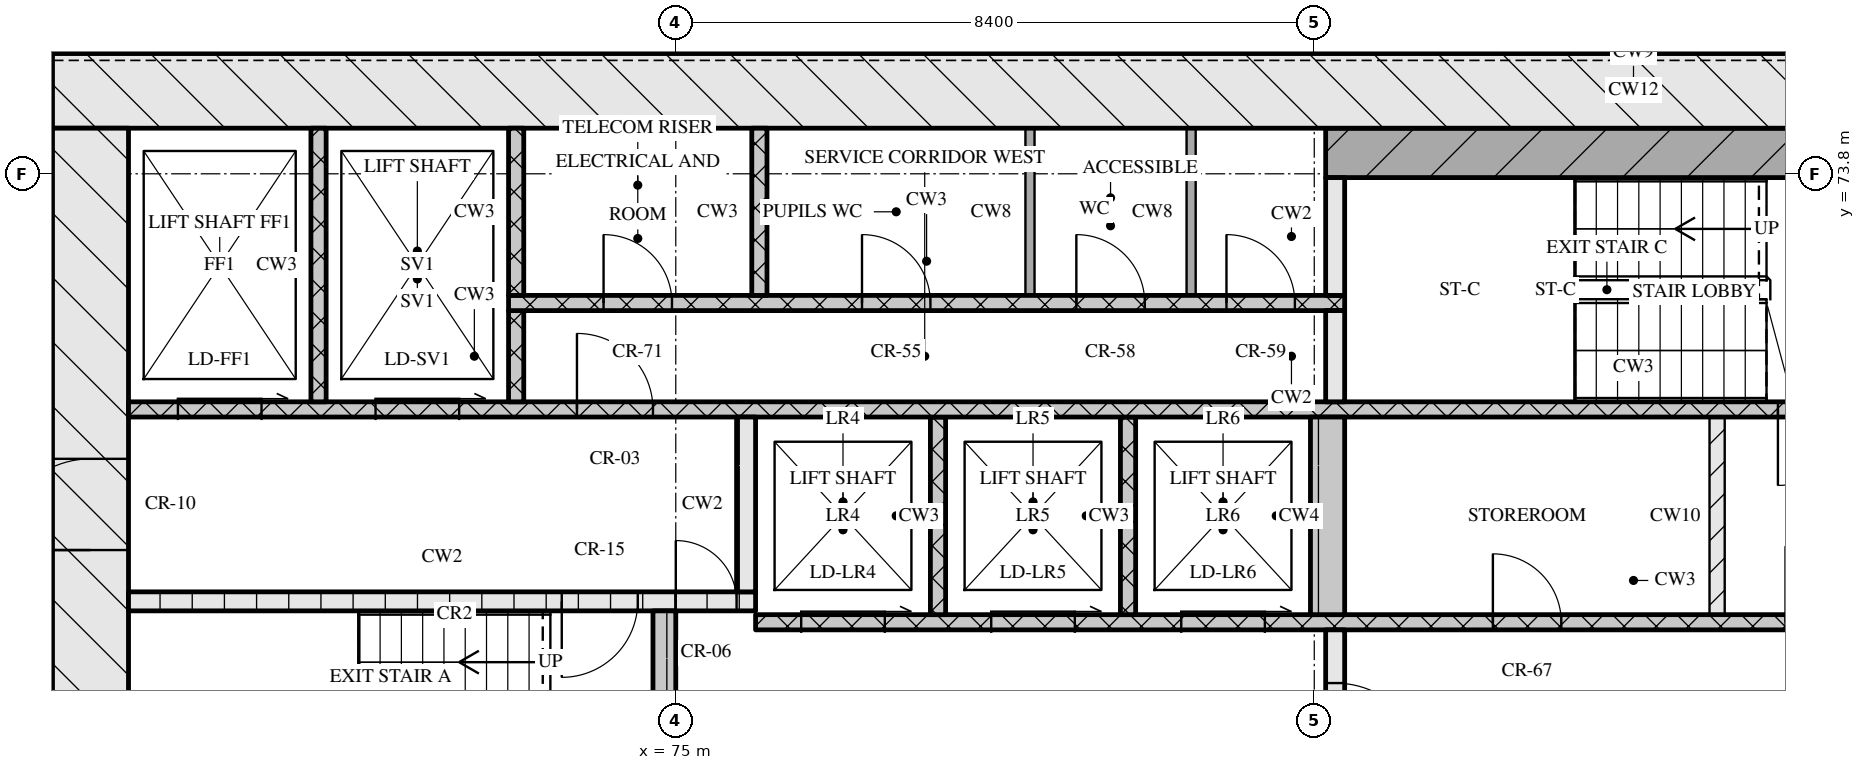
"""IFC4 building model, lengths in metres.
Left out: names, types, materials, properties, quantities, classifications, styles, units other than length and angle.
Written with IfcOpenShell. Run it as: python <this file> out.ifc"""

import sys

from ifc_helpers import new_model, si_unit, direction, frame, frame_2d, origin, place, context, subcontext, project, spatial, rectangle, extrude, element, fill, save


model = new_model("IFC4")
c1 = context("Model", 3, precision=1e-05, world=origin(), true_north=direction((0.0, 1.0)))
c2 = subcontext(c1, "Body", "Model", "MODEL_VIEW")
j1 = project(units=[si_unit("LENGTHUNIT", "METRE"), si_unit("PLANEANGLEUNIT", "RADIAN")], contexts=[c1])
p1 = place(None, origin())
s1 = spatial("IfcSite", under=j1, at=p1, CompositionType="ELEMENT")
p2 = place(p1, origin())
s2 = spatial("IfcBuilding", under=s1, at=p2, CompositionType="ELEMENT")
p3 = place(p2, frame((0.0, 0.0, 109.65)))
s3 = spatial("IfcBuildingStorey", under=s2, at=p3, CompositionType="ELEMENT", Elevation=109.65)
p4 = place(p3, frame((66.8, 74.9, 0.0), z_axis=(0.0, 0.0, 1.0), x_axis=(1.0, 0.0, 0.0)))
e1 = element("IfcWall", 1, at=p4, inside=s3, PredefinedType="SOLIDWALL", context=c2, shape_type="SweptSolid", body=[
    extrude(rectangle(XDim=41.6, YDim=1.0, at=frame_2d((20.8, 0.0))), origin(), (0.0, 0.0, 1.0), 3.32),
])
p5 = place(p3, frame((67.3, 62.4, 0.0), z_axis=(0.0, 0.0, 1.0), x_axis=(0.0, 1.0, 0.0)))
e2 = element("IfcWall", 2, at=p5, inside=s3, PredefinedType="SOLIDWALL", context=c2, shape_type="SweptSolid", body=[
    extrude(rectangle(XDim=12.0, YDim=1.0, at=frame_2d((6.0, 0.0))), origin(), (0.0, 0.0, 1.0), 3.32),
])
p6 = place(p5, frame((6.45, 0.0, 0.0)))
e3 = element("IfcOpeningElement", 3, at=p6, cuts=e2, PredefinedType="OPENING", context=c2, shape_type="SweptSolid", body=[
    extrude(rectangle(XDim=1.2, YDim=2.1, at=frame_2d((0.6, 1.05))), frame((0.0, 0.51, 0.0), z_axis=(0.0, -1.0, 0.0), x_axis=(1.0, 0.0, 0.0)), (0.0, 0.0, 1.0), 1.02),
])
p7 = place(p3, frame((74.85, 65.2, 0.0), z_axis=(0.0, 0.0, 1.0), x_axis=(0.0, 1.0, 0.0)))
e4 = element("IfcWall", 4, at=p7, inside=s3, PredefinedType="SOLIDWALL", context=c2, shape_type="SweptSolid", body=[
    extrude(rectangle(XDim=2.85, YDim=0.3, at=frame_2d((1.425, 0.0))), origin(), (0.0, 0.0, 1.0), 3.32),
])
p8 = place(p3, frame((83.675, 65.2, 0.0), z_axis=(0.0, 0.0, 1.0), x_axis=(0.0, 1.0, 0.0)))
e5 = element("IfcWall", 5, at=p8, inside=s3, PredefinedType="SOLIDWALL", context=c2, shape_type="SweptSolid", body=[
    extrude(rectangle(XDim=2.6, YDim=0.25, at=frame_2d((1.3, 0.0))), origin(), (0.0, 0.0, 1.0), 3.32),
])
p9 = place(p8, frame((0.7, 0.0, 0.0)))
e6 = element("IfcOpeningElement", 6, at=p9, cuts=e5, PredefinedType="OPENING", context=c2, shape_type="SweptSolid", body=[
    extrude(rectangle(XDim=1.2, YDim=2.1, at=frame_2d((0.6, 1.05))), frame((0.0, 0.135, 0.0), z_axis=(0.0, -1.0, 0.0), x_axis=(1.0, 0.0, 0.0)), (0.0, 0.0, 1.0), 0.27),
])
p10 = place(p3, frame((76.05, 67.9, 0.0), z_axis=(0.0, 0.0, 1.0), x_axis=(1.0, 0.0, 0.0)))
e7 = element("IfcWall", 7, at=p10, inside=s3, PredefinedType="SOLIDWALL", context=c2, shape_type="SweptSolid", body=[
    extrude(rectangle(XDim=23.1, YDim=0.2, at=frame_2d((11.55, 0.0))), origin(), (0.0, 0.0, 1.0), 3.32),
])
p11 = place(p10, frame((0.6, 0.0, 0.0)))
e8 = element("IfcOpeningElement", 8, at=p11, cuts=e7, PredefinedType="OPENING", context=c2, shape_type="SweptSolid", body=[
    extrude(rectangle(XDim=1.1, YDim=2.1, at=frame_2d((0.55, 1.05))), frame((0.0, 0.11, 0.0), z_axis=(0.0, -1.0, 0.0), x_axis=(1.0, 0.0, 0.0)), (0.0, 0.0, 1.0), 0.22),
])
p12 = place(p10, frame((3.1, 0.0, 0.0)))
e9 = element("IfcOpeningElement", 9, at=p12, cuts=e7, PredefinedType="OPENING", context=c2, shape_type="SweptSolid", body=[
    extrude(rectangle(XDim=1.1, YDim=2.1, at=frame_2d((0.55, 1.05))), frame((0.0, 0.11, 0.0), z_axis=(0.0, -1.0, 0.0), x_axis=(1.0, 0.0, 0.0)), (0.0, 0.0, 1.0), 0.22),
])
p13 = place(p10, frame((5.6, 0.0, 0.0)))
e10 = element("IfcOpeningElement", 10, at=p13, cuts=e7, PredefinedType="OPENING", context=c2, shape_type="SweptSolid", body=[
    extrude(rectangle(XDim=1.1, YDim=2.1, at=frame_2d((0.55, 1.05))), frame((0.0, 0.11, 0.0), z_axis=(0.0, -1.0, 0.0), x_axis=(1.0, 0.0, 0.0)), (0.0, 0.0, 1.0), 0.22),
])
p14 = place(p10, frame((9.7, 0.0, 0.0)))
e11 = element("IfcOpeningElement", 11, at=p14, cuts=e7, PredefinedType="OPENING", context=c2, shape_type="SweptSolid", body=[
    extrude(rectangle(XDim=0.9, YDim=2.1, at=frame_2d((0.45, 1.05))), frame((0.0, 0.11, 0.0), z_axis=(0.0, -1.0, 0.0), x_axis=(1.0, 0.0, 0.0)), (0.0, 0.0, 1.0), 0.22),
])
p15 = place(p10, frame((13.55, 0.0, 0.0)))
e12 = element("IfcOpeningElement", 12, at=p15, cuts=e7, PredefinedType="OPENING", context=c2, shape_type="SweptSolid", body=[
    extrude(rectangle(XDim=1.0, YDim=2.1, at=frame_2d((0.5, 1.05))), frame((0.0, 0.11, 0.0), z_axis=(0.0, -1.0, 0.0), x_axis=(1.0, 0.0, 0.0)), (0.0, 0.0, 1.0), 0.22),
])
for number, where, z_axis, x_axis in (
    (13, (78.45, 68.0, 0.0), (0.0, 0.0, 1.0), (0.0, 1.0, 0.0)),
    (14, (80.95, 68.0, 0.0), (0.0, 0.0, 1.0), (0.0, 1.0, 0.0)),
):
    element("IfcWall", number, at=place(p3, frame(where, z_axis=z_axis, x_axis=x_axis)), inside=s3, PredefinedType="SOLIDWALL", context=c2, shape_type="SweptSolid", body=[
        extrude(rectangle(XDim=2.6, YDim=0.2, at=frame_2d((1.3, 0.0))), origin(), (0.0, 0.0, 1.0), 3.32),
    ])
p16 = place(p3, frame((83.575, 68.0, 0.0), z_axis=(0.0, 0.0, 1.0), x_axis=(0.0, 1.0, 0.0)))
e15 = element("IfcWall", 15, at=p16, inside=s3, PredefinedType="SOLIDWALL", context=c2, shape_type="SweptSolid", body=[
    extrude(rectangle(XDim=2.6, YDim=0.45, at=frame_2d((1.3, 0.0))), origin(), (0.0, 0.0, 1.0), 3.32),
])
p17 = place(p3, frame((88.7, 68.0, 0.0), z_axis=(0.0, 0.0, 1.0), x_axis=(0.0, 1.0, 0.0)))
e16 = element("IfcWall", 16, at=p17, inside=s3, PredefinedType="PARTITIONING", context=c2, shape_type="SweptSolid", body=[
    extrude(rectangle(XDim=2.6, YDim=0.2, at=frame_2d((1.3, 0.0))), origin(), (0.0, 0.0, 1.0), 3.32),
])
p18 = place(p3, frame((67.8, 68.175, 0.0), z_axis=(0.0, 0.0, 1.0), x_axis=(1.0, 0.0, 0.0)))
e17 = element("IfcWall", 17, at=p18, inside=s3, PredefinedType="SOLIDWALL", context=c2, shape_type="SweptSolid", body=[
    extrude(rectangle(XDim=8.25, YDim=0.25, at=frame_2d((4.125, 0.0))), origin(), (0.0, 0.0, 1.0), 3.32),
])
p19 = place(p18, frame((5.7, 0.0, 0.0)))
e18 = element("IfcOpeningElement", 18, at=p19, cuts=e17, PredefinedType="OPENING", context=c2, shape_type="SweptSolid", body=[
    extrude(rectangle(XDim=1.0, YDim=2.1, at=frame_2d((0.5, 1.05))), frame((0.0, 0.135, 0.0), z_axis=(0.0, -1.0, 0.0), x_axis=(1.0, 0.0, 0.0)), (0.0, 0.0, 1.0), 0.27),
])
p20 = place(p18, frame((7.2, 0.0, 0.0)))
e19 = element("IfcOpeningElement", 19, at=p20, cuts=e17, PredefinedType="OPENING", context=c2, shape_type="SweptSolid", body=[
    extrude(rectangle(XDim=0.8, YDim=2.1, at=frame_2d((0.4, 1.05))), frame((0.0, 0.135, 0.0), z_axis=(0.0, -1.0, 0.0), x_axis=(1.0, 0.0, 0.0)), (0.0, 0.0, 1.0), 0.27),
])
p21 = place(p3, frame((75.925, 68.3, 0.0), z_axis=(0.0, 0.0, 1.0), x_axis=(0.0, 1.0, 0.0)))
e20 = element("IfcWall", 20, at=p21, inside=s3, PredefinedType="SOLIDWALL", context=c2, shape_type="SweptSolid", body=[
    extrude(rectangle(XDim=2.3, YDim=0.25, at=frame_2d((1.15, 0.0))), origin(), (0.0, 0.0, 1.0), 3.32),
])
p22 = place(p3, frame((67.8, 70.7, 0.0), z_axis=(0.0, 0.0, 1.0), x_axis=(1.0, 0.0, 0.0)))
e21 = element("IfcWall", 21, at=p22, inside=s3, PredefinedType="SOLIDWALL", context=c2, shape_type="SweptSolid", body=[
    extrude(rectangle(XDim=39.6, YDim=0.2, at=frame_2d((19.8, 0.0))), origin(), (0.0, 0.0, 1.0), 3.32),
])
p23 = place(p22, frame((0.65, 0.0, 0.0)))
e22 = element("IfcOpeningElement", 22, at=p23, cuts=e21, PredefinedType="OPENING", context=c2, shape_type="SweptSolid", body=[
    extrude(rectangle(XDim=1.1, YDim=2.1, at=frame_2d((0.55, 1.05))), frame((0.0, 0.11, 0.0), z_axis=(0.0, -1.0, 0.0), x_axis=(1.0, 0.0, 0.0)), (0.0, 0.0, 1.0), 0.22),
])
p24 = place(p22, frame((3.25, 0.0, 0.0)))
e23 = element("IfcOpeningElement", 23, at=p24, cuts=e21, PredefinedType="OPENING", context=c2, shape_type="SweptSolid", body=[
    extrude(rectangle(XDim=1.1, YDim=2.1, at=frame_2d((0.55, 1.05))), frame((0.0, 0.11, 0.0), z_axis=(0.0, -1.0, 0.0), x_axis=(1.0, 0.0, 0.0)), (0.0, 0.0, 1.0), 0.22),
])
p25 = place(p22, frame((5.9, 0.0, 0.0)))
e24 = element("IfcOpeningElement", 24, at=p25, cuts=e21, PredefinedType="OPENING", context=c2, shape_type="SweptSolid", body=[
    extrude(rectangle(XDim=1.0, YDim=2.1, at=frame_2d((0.5, 1.05))), frame((0.0, 0.11, 0.0), z_axis=(0.0, -1.0, 0.0), x_axis=(1.0, 0.0, 0.0)), (0.0, 0.0, 1.0), 0.22),
])
p26 = place(p22, frame((21.7, 0.0, 0.0)))
e25 = element("IfcOpeningElement", 25, at=p26, cuts=e21, PredefinedType="OPENING", context=c2, shape_type="SweptSolid", body=[
    extrude(rectangle(XDim=1.0, YDim=2.1, at=frame_2d((0.5, 1.05))), frame((0.0, 0.11, 0.0), z_axis=(0.0, -1.0, 0.0), x_axis=(1.0, 0.0, 0.0)), (0.0, 0.0, 1.0), 0.22),
])
p27 = place(p22, frame((32.7, 0.0, 0.0)))
e26 = element("IfcOpeningElement", 26, at=p27, cuts=e21, PredefinedType="OPENING", context=c2, shape_type="SweptSolid", body=[
    extrude(rectangle(XDim=1.0, YDim=2.1, at=frame_2d((0.5, 1.05))), frame((0.0, 0.11, 0.0), z_axis=(0.0, -1.0, 0.0), x_axis=(1.0, 0.0, 0.0)), (0.0, 0.0, 1.0), 0.22),
])
p28 = place(p22, frame((35.25, 0.0, 0.0)))
e27 = element("IfcOpeningElement", 27, at=p28, cuts=e21, PredefinedType="OPENING", context=c2, shape_type="SweptSolid", body=[
    extrude(rectangle(XDim=1.1, YDim=2.1, at=frame_2d((0.55, 1.05))), frame((0.0, 0.11, 0.0), z_axis=(0.0, -1.0, 0.0), x_axis=(1.0, 0.0, 0.0)), (0.0, 0.0, 1.0), 0.22),
])
p29 = place(p22, frame((37.85, 0.0, 0.0)))
e28 = element("IfcOpeningElement", 28, at=p29, cuts=e21, PredefinedType="OPENING", context=c2, shape_type="SweptSolid", body=[
    extrude(rectangle(XDim=1.1, YDim=2.1, at=frame_2d((0.55, 1.05))), frame((0.0, 0.11, 0.0), z_axis=(0.0, -1.0, 0.0), x_axis=(1.0, 0.0, 0.0)), (0.0, 0.0, 1.0), 0.22),
])
p30 = place(p3, frame((70.3, 70.8, 0.0), z_axis=(0.0, 0.0, 1.0), x_axis=(0.0, 1.0, 0.0)))
e29 = element("IfcWall", 29, at=p30, inside=s3, PredefinedType="SOLIDWALL", context=c2, shape_type="SweptSolid", body=[
    extrude(rectangle(XDim=3.6, YDim=0.2, at=frame_2d((1.8, 0.0))), origin(), (0.0, 0.0, 1.0), 3.32),
])
p31 = place(p3, frame((72.9, 70.8, 0.0), z_axis=(0.0, 0.0, 1.0), x_axis=(0.0, 1.0, 0.0)))
e30 = element("IfcWall", 30, at=p31, inside=s3, PredefinedType="SOLIDWALL", context=c2, shape_type="SweptSolid", body=[
    extrude(rectangle(XDim=1.2, YDim=0.2, at=frame_2d((0.6, 0.0))), origin(), (0.0, 0.0, 1.0), 3.32),
])
p32 = place(p3, frame((83.675, 70.8, 0.0), z_axis=(0.0, 0.0, 1.0), x_axis=(0.0, 1.0, 0.0)))
e31 = element("IfcWall", 31, at=p32, inside=s3, PredefinedType="SOLIDWALL", context=c2, shape_type="SweptSolid", body=[
    extrude(rectangle(XDim=1.2, YDim=0.25, at=frame_2d((0.6, 0.0))), origin(), (0.0, 0.0, 1.0), 3.32),
])
p33 = place(p3, frame((72.8, 72.1, 0.0), z_axis=(0.0, 0.0, 1.0), x_axis=(1.0, 0.0, 0.0)))
e32 = element("IfcWall", 32, at=p33, inside=s3, PredefinedType="SOLIDWALL", context=c2, shape_type="SweptSolid", body=[
    extrude(rectangle(XDim=11.0, YDim=0.2, at=frame_2d((5.5, 0.0))), origin(), (0.0, 0.0, 1.0), 3.32),
])
p34 = place(p33, frame((1.25, 0.0, 0.0)))
e33 = element("IfcOpeningElement", 33, at=p34, cuts=e32, PredefinedType="OPENING", context=c2, shape_type="SweptSolid", body=[
    extrude(rectangle(XDim=0.9, YDim=2.1, at=frame_2d((0.45, 1.05))), frame((0.0, 0.11, 0.0), z_axis=(0.0, -1.0, 0.0), x_axis=(1.0, 0.0, 0.0)), (0.0, 0.0, 1.0), 0.22),
])
p35 = place(p33, frame((4.65, 0.0, 0.0)))
e34 = element("IfcOpeningElement", 34, at=p35, cuts=e32, PredefinedType="OPENING", context=c2, shape_type="SweptSolid", body=[
    extrude(rectangle(XDim=0.9, YDim=2.1, at=frame_2d((0.45, 1.05))), frame((0.0, 0.11, 0.0), z_axis=(0.0, -1.0, 0.0), x_axis=(1.0, 0.0, 0.0)), (0.0, 0.0, 1.0), 0.22),
])
p36 = place(p33, frame((7.47, 0.0, 0.0)))
e35 = element("IfcOpeningElement", 35, at=p36, cuts=e32, PredefinedType="OPENING", context=c2, shape_type="SweptSolid", body=[
    extrude(rectangle(XDim=0.9, YDim=2.1, at=frame_2d((0.45, 1.05))), frame((0.0, 0.11, 0.0), z_axis=(0.0, -1.0, 0.0), x_axis=(1.0, 0.0, 0.0)), (0.0, 0.0, 1.0), 0.22),
])
p37 = place(p33, frame((9.445, 0.0, 0.0)))
e36 = element("IfcOpeningElement", 36, at=p37, cuts=e32, PredefinedType="OPENING", context=c2, shape_type="SweptSolid", body=[
    extrude(rectangle(XDim=0.9, YDim=2.1, at=frame_2d((0.45, 1.05))), frame((0.0, 0.11, 0.0), z_axis=(0.0, -1.0, 0.0), x_axis=(1.0, 0.0, 0.0)), (0.0, 0.0, 1.0), 0.22),
])
for number, where, z_axis, x_axis in (
    (37, (72.9, 72.2, 0.0), (0.0, 0.0, 1.0), (0.0, 1.0, 0.0)),
    (38, (76.1, 72.2, 0.0), (0.0, 0.0, 1.0), (0.0, 1.0, 0.0)),
):
    element("IfcWall", number, at=place(p3, frame(where, z_axis=z_axis, x_axis=x_axis)), inside=s3, PredefinedType="SOLIDWALL", context=c2, shape_type="SweptSolid", body=[
        extrude(rectangle(XDim=2.2, YDim=0.2, at=frame_2d((1.1, 0.0))), origin(), (0.0, 0.0, 1.0), 3.32),
    ])
for number, where, z_axis, x_axis in (
    (39, (79.66, 72.2, 0.0), (0.0, 0.0, 1.0), (0.0, 1.0, 0.0)),
    (40, (81.78, 72.2, 0.0), (0.0, 0.0, 1.0), (0.0, 1.0, 0.0)),
):
    element("IfcWall", number, at=place(p3, frame(where, z_axis=z_axis, x_axis=x_axis)), inside=s3, PredefinedType="PARTITIONING", context=c2, shape_type="SweptSolid", body=[
        extrude(rectangle(XDim=2.2, YDim=0.12, at=frame_2d((1.1, 0.0))), origin(), (0.0, 0.0, 1.0), 3.32),
    ])
p38 = place(p3, frame((83.675, 72.2, 0.0), z_axis=(0.0, 0.0, 1.0), x_axis=(0.0, 1.0, 0.0)))
e41 = element("IfcWall", 41, at=p38, inside=s3, PredefinedType="SOLIDWALL", context=c2, shape_type="SweptSolid", body=[
    extrude(rectangle(XDim=1.55, YDim=0.25, at=frame_2d((0.775, 0.0))), origin(), (0.0, 0.0, 1.0), 3.32),
])
p39 = place(p3, frame((83.55, 74.075, 0.0), z_axis=(0.0, 0.0, 1.0), x_axis=(1.0, 0.0, 0.0)))
e42 = element("IfcWall", 42, at=p39, inside=s3, PredefinedType="SOLIDWALL", context=c2, shape_type="SweptSolid", body=[
    extrude(rectangle(XDim=8.1, YDim=0.65, at=frame_2d((4.05, 0.0))), origin(), (0.0, 0.0, 1.0), 3.32),
])
p40 = place(p9, origin())
e43 = element("IfcDoor", 43, at=p40, inside=s3, OperationType="SINGLE_SWING_RIGHT", PredefinedType="DOOR", context=c2, shape_type="SweptSolid", body=[
    extrude(rectangle(XDim=1.2, YDim=2.1, at=frame_2d((0.6, 1.05))), frame((0.0, 0.025, 0.0), z_axis=(0.0, -1.0, 0.0), x_axis=(1.0, 0.0, 0.0)), (0.0, 0.0, 1.0), 0.05),
])
fill(e6, e43)
p41 = place(p11, origin())
e44 = element("IfcDoor", 44, at=p41, inside=s3, OperationType="SLIDING_TO_RIGHT", PredefinedType="DOOR", context=c2, shape_type="SweptSolid", body=[
    extrude(rectangle(XDim=1.1, YDim=2.1, at=frame_2d((0.55, 1.05))), frame((0.0, 0.025, 0.0), z_axis=(0.0, -1.0, 0.0), x_axis=(1.0, 0.0, 0.0)), (0.0, 0.0, 1.0), 0.05),
])
fill(e8, e44)
p42 = place(p12, origin())
e45 = element("IfcDoor", 45, at=p42, inside=s3, OperationType="SLIDING_TO_RIGHT", PredefinedType="DOOR", context=c2, shape_type="SweptSolid", body=[
    extrude(rectangle(XDim=1.1, YDim=2.1, at=frame_2d((0.55, 1.05))), frame((0.0, 0.025, 0.0), z_axis=(0.0, -1.0, 0.0), x_axis=(1.0, 0.0, 0.0)), (0.0, 0.0, 1.0), 0.05),
])
fill(e9, e45)
p43 = place(p13, origin())
e46 = element("IfcDoor", 46, at=p43, inside=s3, OperationType="SLIDING_TO_RIGHT", PredefinedType="DOOR", context=c2, shape_type="SweptSolid", body=[
    extrude(rectangle(XDim=1.1, YDim=2.1, at=frame_2d((0.55, 1.05))), frame((0.0, 0.025, 0.0), z_axis=(0.0, -1.0, 0.0), x_axis=(1.0, 0.0, 0.0)), (0.0, 0.0, 1.0), 0.05),
])
fill(e10, e46)
p44 = place(p14, origin())
e47 = element("IfcDoor", 47, at=p44, inside=s3, OperationType="SINGLE_SWING_LEFT", PredefinedType="DOOR", context=c2, shape_type="SweptSolid", body=[
    extrude(rectangle(XDim=0.9, YDim=2.1, at=frame_2d((0.45, 1.05))), frame((0.0, 0.025, 0.0), z_axis=(0.0, -1.0, 0.0), x_axis=(1.0, 0.0, 0.0)), (0.0, 0.0, 1.0), 0.05),
])
fill(e11, e47)
p45 = place(p19, origin())
e48 = element("IfcDoor", 48, at=p45, inside=s3, OperationType="SINGLE_SWING_RIGHT", PredefinedType="DOOR", context=c2, shape_type="SweptSolid", body=[
    extrude(rectangle(XDim=1.0, YDim=2.1, at=frame_2d((0.5, 1.05))), frame((0.0, 0.025, 0.0), z_axis=(0.0, -1.0, 0.0), x_axis=(1.0, 0.0, 0.0)), (0.0, 0.0, 1.0), 0.05),
])
fill(e18, e48)
p46 = place(p20, origin())
e49 = element("IfcDoor", 49, at=p46, inside=s3, OperationType="SINGLE_SWING_LEFT", PredefinedType="DOOR", context=c2, shape_type="SweptSolid", body=[
    extrude(rectangle(XDim=0.8, YDim=2.1, at=frame_2d((0.4, 1.05))), frame((0.0, 0.025, 0.0), z_axis=(0.0, -1.0, 0.0), x_axis=(1.0, 0.0, 0.0)), (0.0, 0.0, 1.0), 0.05),
])
fill(e19, e49)
p47 = place(p6, origin())
e50 = element("IfcDoor", 50, at=p47, inside=s3, OperationType="SINGLE_SWING_LEFT", PredefinedType="DOOR", context=c2, shape_type="SweptSolid", body=[
    extrude(rectangle(XDim=1.2, YDim=2.1, at=frame_2d((0.6, 1.05))), frame((0.0, 0.025, 0.0), z_axis=(0.0, -1.0, 0.0), x_axis=(1.0, 0.0, 0.0)), (0.0, 0.0, 1.0), 0.05),
])
fill(e3, e50)
p48 = place(p23, origin())
e51 = element("IfcDoor", 51, at=p48, inside=s3, OperationType="SLIDING_TO_RIGHT", PredefinedType="DOOR", context=c2, shape_type="SweptSolid", body=[
    extrude(rectangle(XDim=1.1, YDim=2.1, at=frame_2d((0.55, 1.05))), frame((0.0, 0.025, 0.0), z_axis=(0.0, -1.0, 0.0), x_axis=(1.0, 0.0, 0.0)), (0.0, 0.0, 1.0), 0.05),
])
fill(e22, e51)
p49 = place(p24, origin())
e52 = element("IfcDoor", 52, at=p49, inside=s3, OperationType="SLIDING_TO_RIGHT", PredefinedType="DOOR", context=c2, shape_type="SweptSolid", body=[
    extrude(rectangle(XDim=1.1, YDim=2.1, at=frame_2d((0.55, 1.05))), frame((0.0, 0.025, 0.0), z_axis=(0.0, -1.0, 0.0), x_axis=(1.0, 0.0, 0.0)), (0.0, 0.0, 1.0), 0.05),
])
fill(e23, e52)
p50 = place(p25, origin())
e53 = element("IfcDoor", 53, at=p50, inside=s3, OperationType="SINGLE_SWING_LEFT", PredefinedType="DOOR", context=c2, shape_type="SweptSolid", body=[
    extrude(rectangle(XDim=1.0, YDim=2.1, at=frame_2d((0.5, 1.05))), frame((0.0, 0.025, 0.0), z_axis=(0.0, -1.0, 0.0), x_axis=(1.0, 0.0, 0.0)), (0.0, 0.0, 1.0), 0.05),
])
fill(e24, e53)
p51 = place(p26, origin())
e54 = element("IfcDoor", 54, at=p51, inside=s3, OperationType="SINGLE_SWING_RIGHT", PredefinedType="DOOR", context=c2, shape_type="SweptSolid", body=[
    extrude(rectangle(XDim=1.0, YDim=2.1, at=frame_2d((0.5, 1.05))), frame((0.0, 0.025, 0.0), z_axis=(0.0, -1.0, 0.0), x_axis=(1.0, 0.0, 0.0)), (0.0, 0.0, 1.0), 0.05),
])
fill(e25, e54)
p52 = place(p34, origin())
e55 = element("IfcDoor", 55, at=p52, inside=s3, OperationType="SINGLE_SWING_LEFT", PredefinedType="DOOR", context=c2, shape_type="SweptSolid", body=[
    extrude(rectangle(XDim=0.9, YDim=2.1, at=frame_2d((0.45, 1.05))), frame((0.0, 0.025, 0.0), z_axis=(0.0, -1.0, 0.0), x_axis=(1.0, 0.0, 0.0)), (0.0, 0.0, 1.0), 0.05),
])
fill(e33, e55)
p53 = place(p35, origin())
e56 = element("IfcDoor", 56, at=p53, inside=s3, OperationType="SINGLE_SWING_LEFT", PredefinedType="DOOR", context=c2, shape_type="SweptSolid", body=[
    extrude(rectangle(XDim=0.9, YDim=2.1, at=frame_2d((0.45, 1.05))), frame((0.0, 0.025, 0.0), z_axis=(0.0, -1.0, 0.0), x_axis=(1.0, 0.0, 0.0)), (0.0, 0.0, 1.0), 0.05),
])
fill(e34, e56)
p54 = place(p36, origin())
e57 = element("IfcDoor", 57, at=p54, inside=s3, OperationType="SINGLE_SWING_LEFT", PredefinedType="DOOR", context=c2, shape_type="SweptSolid", body=[
    extrude(rectangle(XDim=0.9, YDim=2.1, at=frame_2d((0.45, 1.05))), frame((0.0, 0.025, 0.0), z_axis=(0.0, -1.0, 0.0), x_axis=(1.0, 0.0, 0.0)), (0.0, 0.0, 1.0), 0.05),
])
fill(e35, e57)
p55 = place(p37, origin())
e58 = element("IfcDoor", 58, at=p55, inside=s3, OperationType="SINGLE_SWING_LEFT", PredefinedType="DOOR", context=c2, shape_type="SweptSolid", body=[
    extrude(rectangle(XDim=0.9, YDim=2.1, at=frame_2d((0.45, 1.05))), frame((0.0, 0.025, 0.0), z_axis=(0.0, -1.0, 0.0), x_axis=(1.0, 0.0, 0.0)), (0.0, 0.0, 1.0), 0.05),
])
fill(e36, e58)
save(model, sys.argv[1])
